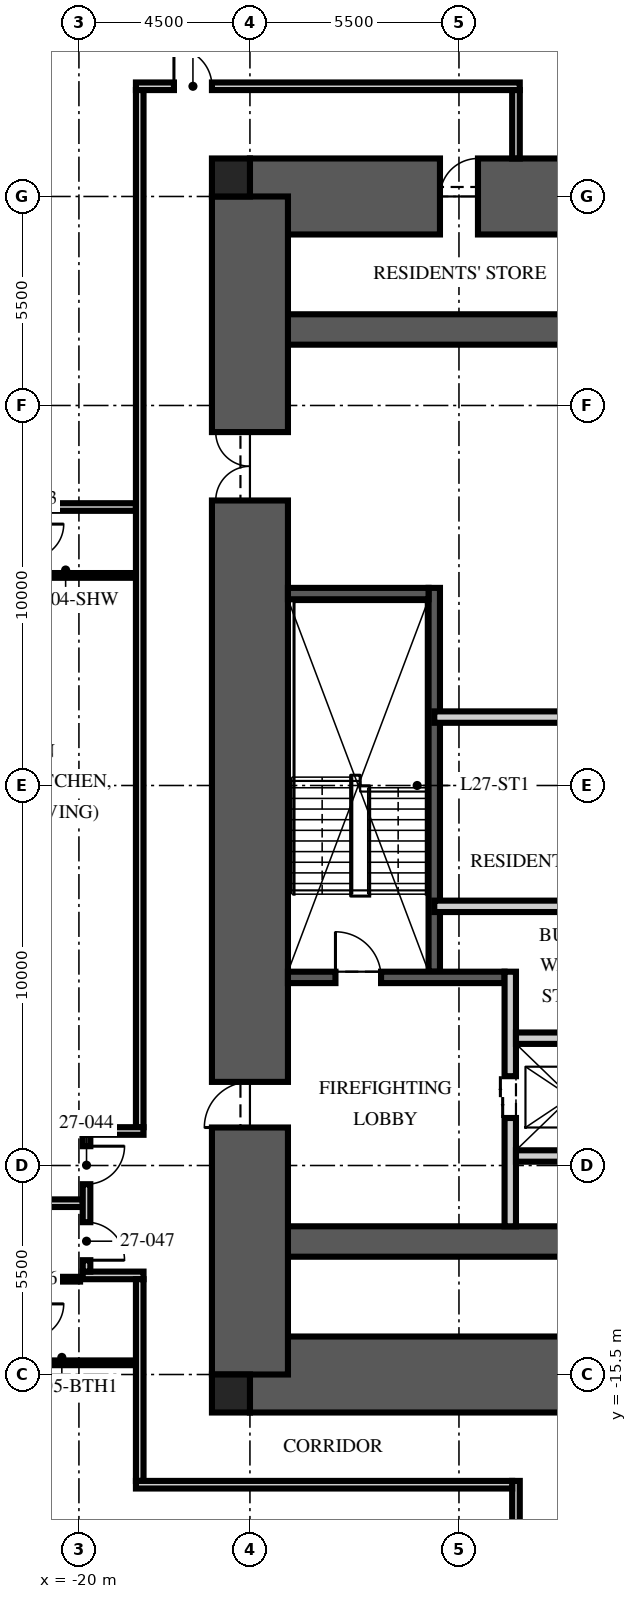
"""IFC4 building model, lengths in metres.
Left out: names, types, materials, properties, quantities, classifications, styles, units other than length and angle.
Written with IfcOpenShell. Run it as: python <this file> out.ifc"""

import sys

from ifc_helpers import new_model, si_unit, direction, frame, frame_2d, origin, origin_2d, place, context, subcontext, project, spatial, rectangle, extrude, element, fill, save


model = new_model("IFC4")
c1 = context("Model", 3, precision=1e-05, world=origin(), true_north=direction((0.0, 1.0)))
c2 = subcontext(c1, "Body", "Model", "MODEL_VIEW")
j1 = project(units=[si_unit("LENGTHUNIT", "METRE"), si_unit("PLANEANGLEUNIT", "RADIAN")], contexts=[c1])
p1 = place(None, origin())
s1 = spatial("IfcSite", under=j1, at=p1, CompositionType="ELEMENT")
p2 = place(p1, origin())
s2 = spatial("IfcBuilding", under=s1, at=p2, CompositionType="ELEMENT")
p3 = place(p2, frame((0.0, 0.0, 111.0)))
s3 = spatial("IfcBuildingStorey", under=s2, at=p3, CompositionType="ELEMENT", Elevation=111.0)
p4 = place(p3, frame((-15.5, 15.5, -0.25), z_axis=(0.0, 0.0, 1.0), x_axis=(1.0, 0.0, 0.0)))
e1 = element("IfcWall", 1, at=p4, inside=s3, PredefinedType="SHEAR", context=c2, shape_type="SweptSolid", body=[
    extrude(rectangle(XDim=31.0, YDim=2.0, at=frame_2d((15.5, 0.0))), origin(), (0.0, 0.0, 1.0), 3.75),
])
p5 = place(p4, frame((5.0, 0.0, 0.25)))
e2 = element("IfcOpeningElement", 2, at=p5, cuts=e1, PredefinedType="OPENING", context=c2, shape_type="SweptSolid", body=[
    extrude(rectangle(XDim=1.0, YDim=2.1, at=frame_2d((0.5, 1.05))), frame((0.0, 1.01, 0.0), z_axis=(0.0, -1.0, 0.0), x_axis=(1.0, 0.0, 0.0)), (0.0, 0.0, 1.0), 2.02),
])
p6 = place(p3, frame((-15.5, -15.5, -0.25), z_axis=(0.0, 0.0, 1.0), x_axis=(1.0, 0.0, 0.0)))
e3 = element("IfcWall", 3, at=p6, inside=s3, PredefinedType="SHEAR", context=c2, shape_type="SweptSolid", body=[
    extrude(rectangle(XDim=31.0, YDim=2.0, at=frame_2d((15.5, 0.0))), origin(), (0.0, 0.0, 1.0), 3.75),
])
p7 = place(p6, frame((10.4, 0.0, 0.25)))
e4 = element("IfcOpeningElement", 4, at=p7, cuts=e3, PredefinedType="OPENING", context=c2, shape_type="SweptSolid", body=[
    extrude(rectangle(XDim=1.1, YDim=2.1, at=frame_2d((0.55, 1.05))), frame((0.0, 1.01, 0.0), z_axis=(0.0, -1.0, 0.0), x_axis=(1.0, 0.0, 0.0)), (0.0, 0.0, 1.0), 2.02),
])
p8 = place(p6, frame((13.5, 0.0, 0.25)))
e5 = element("IfcOpeningElement", 5, at=p8, cuts=e3, PredefinedType="OPENING", context=c2, shape_type="SweptSolid", body=[
    extrude(rectangle(XDim=1.1, YDim=2.1, at=frame_2d((0.55, 1.05))), frame((0.0, 1.01, 0.0), z_axis=(0.0, -1.0, 0.0), x_axis=(1.0, 0.0, 0.0)), (0.0, 0.0, 1.0), 2.02),
])
p9 = place(p6, frame((16.6, 0.0, 0.25)))
e6 = element("IfcOpeningElement", 6, at=p9, cuts=e3, PredefinedType="OPENING", context=c2, shape_type="SweptSolid", body=[
    extrude(rectangle(XDim=1.1, YDim=2.1, at=frame_2d((0.55, 1.05))), frame((0.0, 1.01, 0.0), z_axis=(0.0, -1.0, 0.0), x_axis=(1.0, 0.0, 0.0)), (0.0, 0.0, 1.0), 2.02),
])
for number, where, z_axis, x_axis in (
    (7, (-15.5, 12.0, -0.25), (0.0, 0.0, 1.0), (1.0, 0.0, 0.0)),
    (8, (-15.5, -12.0, -0.25), (0.0, 0.0, 1.0), (1.0, 0.0, 0.0)),
):
    element("IfcWall", number, at=place(p3, frame(where, z_axis=z_axis, x_axis=x_axis)), inside=s3, PredefinedType="SHEAR", context=c2, shape_type="SweptSolid", body=[
        extrude(rectangle(XDim=31.0, YDim=0.8, at=frame_2d((15.5, 0.0))), origin(), (0.0, 0.0, 1.0), 3.75),
    ])
p10 = place(p3, frame((-15.5, -15.5, -0.25), z_axis=(0.0, 0.0, 1.0), x_axis=(0.0, 1.0, 0.0)))
e9 = element("IfcWall", 9, at=p10, inside=s3, PredefinedType="SHEAR", context=c2, shape_type="SweptSolid", body=[
    extrude(rectangle(XDim=31.0, YDim=2.0, at=frame_2d((15.5, 0.0))), origin(), (0.0, 0.0, 1.0), 3.75),
])
p11 = place(p10, frame((6.5, 0.0, 0.25)))
e10 = element("IfcOpeningElement", 10, at=p11, cuts=e9, PredefinedType="OPENING", context=c2, shape_type="SweptSolid", body=[
    extrude(rectangle(XDim=1.2, YDim=2.1, at=frame_2d((0.6, 1.05))), frame((0.0, 1.01, 0.0), z_axis=(0.0, -1.0, 0.0), x_axis=(1.0, 0.0, 0.0)), (0.0, 0.0, 1.0), 2.02),
])
p12 = place(p10, frame((23.0, 0.0, 0.25)))
e11 = element("IfcOpeningElement", 11, at=p12, cuts=e9, PredefinedType="OPENING", context=c2, shape_type="SweptSolid", body=[
    extrude(rectangle(XDim=1.8, YDim=2.1, at=frame_2d((0.9, 1.05))), frame((0.0, 1.01, 0.0), z_axis=(0.0, -1.0, 0.0), x_axis=(1.0, 0.0, 0.0)), (0.0, 0.0, 1.0), 2.02),
])
for number, where, z_axis, x_axis in (
    (12, (-16.0, 16.0, -0.25), (0.0, 0.0, 1.0), (1.0, 0.0, 0.0)),
    (13, (-16.0, -16.0, -0.25), (0.0, 0.0, 1.0), (1.0, 0.0, 0.0)),
):
    element("IfcColumn", number, at=place(p3, frame(where, z_axis=z_axis, x_axis=x_axis)), inside=s3, PredefinedType="COLUMN", context=c2, shape_type="SweptSolid", body=[
        extrude(rectangle(XDim=1.0, YDim=1.0, at=origin_2d()), origin(), (0.0, 0.0, 1.0), 3.75),
    ])
p13 = place(p3, frame((-10.65, -4.9, 0.0), z_axis=(0.0, 0.0, 1.0), x_axis=(0.0, 1.0, 0.0)))
e14 = element("IfcWall", 14, at=p13, inside=s3, PredefinedType="SOLIDWALL", context=c2, shape_type="SweptSolid", body=[
    extrude(rectangle(XDim=10.1, YDim=0.3, at=frame_2d((5.05, 0.0))), origin(), (0.0, 0.0, 1.0), 3.5),
])
p14 = place(p3, frame((-14.5, -5.05, 0.0), z_axis=(0.0, 0.0, 1.0), x_axis=(1.0, 0.0, 0.0)))
e15 = element("IfcWall", 15, at=p14, inside=s3, PredefinedType="SOLIDWALL", context=c2, shape_type="SweptSolid", body=[
    extrude(rectangle(XDim=5.7, YDim=0.3, at=frame_2d((2.85, 0.0))), origin(), (0.0, 0.0, 1.0), 3.5),
])
p15 = place(p14, frame((1.25, 0.0, 0.0)))
e16 = element("IfcOpeningElement", 16, at=p15, cuts=e15, PredefinedType="OPENING", context=c2, shape_type="SweptSolid", body=[
    extrude(rectangle(XDim=1.2, YDim=2.1, at=frame_2d((0.6, 1.05))), frame((0.0, 0.16, 0.0), z_axis=(0.0, -1.0, 0.0), x_axis=(1.0, 0.0, 0.0)), (0.0, 0.0, 1.0), 0.32),
])
p16 = place(p3, frame((-14.5, 5.05, 0.0), z_axis=(0.0, 0.0, 1.0), x_axis=(1.0, 0.0, 0.0)))
e17 = element("IfcWall", 17, at=p16, inside=s3, PredefinedType="SOLIDWALL", context=c2, shape_type="SweptSolid", body=[
    extrude(rectangle(XDim=3.7, YDim=0.3, at=frame_2d((1.85, 0.0))), origin(), (0.0, 0.0, 1.0), 3.5),
])
p17 = place(p3, frame((-8.65, -11.6, 0.0), z_axis=(0.0, 0.0, 1.0), x_axis=(0.0, 1.0, 0.0)))
e18 = element("IfcWall", 18, at=p17, inside=s3, PredefinedType="PARTITIONING", context=c2, shape_type="SweptSolid", body=[
    extrude(rectangle(XDim=6.7, YDim=0.3, at=frame_2d((3.35, 0.0))), origin(), (0.0, 0.0, 1.0), 3.5),
])
p18 = place(p17, frame((2.85, 0.0, 0.0)))
e19 = element("IfcOpeningElement", 19, at=p18, cuts=e18, PredefinedType="OPENING", context=c2, shape_type="SweptSolid", body=[
    extrude(rectangle(XDim=1.1, YDim=2.1, at=frame_2d((0.55, 1.05))), frame((0.0, 0.16, 0.0), z_axis=(0.0, -1.0, 0.0), x_axis=(1.0, 0.0, 0.0)), (0.0, 0.0, 1.0), 0.32),
])
p19 = place(p3, frame((-8.5, -6.65, 0.0), z_axis=(0.0, 0.0, 1.0), x_axis=(1.0, 0.0, 0.0)))
e20 = element("IfcWall", 20, at=p19, inside=s3, PredefinedType="PARTITIONING", context=c2, shape_type="SweptSolid", body=[
    extrude(rectangle(XDim=17.0, YDim=0.3, at=frame_2d((8.5, 0.0))), origin(), (0.0, 0.0, 1.0), 3.5),
])
p20 = place(p19, frame((7.8, 0.0, 0.0)))
e21 = element("IfcOpeningElement", 21, at=p20, cuts=e20, PredefinedType="OPENING", context=c2, shape_type="SweptSolid", body=[
    extrude(rectangle(XDim=1.3, YDim=2.4, at=frame_2d((0.65, 1.2))), frame((0.0, 0.16, 0.0), z_axis=(0.0, -1.0, 0.0), x_axis=(1.0, 0.0, 0.0)), (0.0, 0.0, 1.0), 0.32),
])
p21 = place(p19, frame((5.65, 0.0, 0.0)))
e22 = element("IfcOpeningElement", 22, at=p21, cuts=e20, PredefinedType="OPENING", context=c2, shape_type="SweptSolid", body=[
    extrude(rectangle(XDim=0.9, YDim=2.1, at=frame_2d((0.45, 1.05))), frame((0.0, 0.16, 0.0), z_axis=(0.0, -1.0, 0.0), x_axis=(1.0, 0.0, 0.0)), (0.0, 0.0, 1.0), 0.32),
])
p22 = place(p19, frame((10.4, 0.0, 0.0)))
e23 = element("IfcOpeningElement", 23, at=p22, cuts=e20, PredefinedType="OPENING", context=c2, shape_type="SweptSolid", body=[
    extrude(rectangle(XDim=0.9, YDim=2.1, at=frame_2d((0.45, 1.05))), frame((0.0, 0.16, 0.0), z_axis=(0.0, -1.0, 0.0), x_axis=(1.0, 0.0, 0.0)), (0.0, 0.0, 1.0), 0.32),
])
p23 = place(p3, frame((-8.5, -9.75, 0.0), z_axis=(0.0, 0.0, 1.0), x_axis=(1.0, 0.0, 0.0)))
e24 = element("IfcWall", 24, at=p23, inside=s3, PredefinedType="PARTITIONING", context=c2, shape_type="SweptSolid", body=[
    extrude(rectangle(XDim=2.9, YDim=0.3, at=frame_2d((1.45, 0.0))), origin(), (0.0, 0.0, 1.0), 3.5),
])
p24 = place(p3, frame((-10.65, 1.8, 0.0), z_axis=(0.0, 0.0, 1.0), x_axis=(1.0, 0.0, 0.0)))
e25 = element("IfcWall", 25, at=p24, inside=s3, PredefinedType="PARTITIONING", context=c2, shape_type="SweptSolid", body=[
    extrude(rectangle(XDim=21.3, YDim=0.3, at=frame_2d((10.65, 0.0))), origin(), (0.0, 0.0, 1.0), 3.5),
])
p25 = place(p24, frame((10.05, 0.0, 0.0)))
e26 = element("IfcOpeningElement", 26, at=p25, cuts=e25, PredefinedType="OPENING", context=c2, shape_type="SweptSolid", body=[
    extrude(rectangle(XDim=1.2, YDim=2.1, at=frame_2d((0.6, 1.05))), frame((0.0, 0.16, 0.0), z_axis=(0.0, -1.0, 0.0), x_axis=(1.0, 0.0, 0.0)), (0.0, 0.0, 1.0), 0.32),
])
p26 = place(p24, frame((19.238, 0.0, 0.0)))
e27 = element("IfcOpeningElement", 27, at=p26, cuts=e25, PredefinedType="OPENING", context=c2, shape_type="SweptSolid", body=[
    extrude(rectangle(XDim=0.9, YDim=2.1, at=frame_2d((0.45, 1.05))), frame((0.0, 0.16, 0.0), z_axis=(0.0, -1.0, 0.0), x_axis=(1.0, 0.0, 0.0)), (0.0, 0.0, 1.0), 0.32),
])
p27 = place(p3, frame((-10.65, -3.18, 0.0), z_axis=(0.0, 0.0, 1.0), x_axis=(1.0, 0.0, 0.0)))
e28 = element("IfcWall", 28, at=p27, inside=s3, PredefinedType="PARTITIONING", context=c2, shape_type="SweptSolid", body=[
    extrude(rectangle(XDim=6.45, YDim=0.3, at=frame_2d((3.225, 0.0))), origin(), (0.0, 0.0, 1.0), 3.5),
])
p28 = place(p3, frame((-18.5, 18.4, 0.0), z_axis=(0.0, 0.0, 1.0), x_axis=(1.0, 0.0, 0.0)))
e29 = element("IfcWall", 29, at=p28, inside=s3, PredefinedType="PARTITIONING", context=c2, shape_type="SweptSolid", body=[
    extrude(rectangle(XDim=10.1, YDim=0.2, at=frame_2d((5.05, 0.0))), origin(), (0.0, 0.0, 1.0), 2.3),
])
p29 = place(p28, frame((1.0, 0.0, 0.0)))
e30 = element("IfcOpeningElement", 30, at=p29, cuts=e29, PredefinedType="OPENING", context=c2, shape_type="SweptSolid", body=[
    extrude(rectangle(XDim=1.0, YDim=2.2, at=frame_2d((0.5, 1.1))), frame((0.0, 0.11, 0.0), z_axis=(0.0, -1.0, 0.0), x_axis=(1.0, 0.0, 0.0)), (0.0, 0.0, 1.0), 0.22),
])
p30 = place(p3, frame((-8.5, 18.3, 0.0), z_axis=(0.0, 0.0, 1.0), x_axis=(0.0, -1.0, 0.0)))
e31 = element("IfcWall", 31, at=p30, inside=s3, PredefinedType="PARTITIONING", context=c2, shape_type="SweptSolid", body=[
    extrude(rectangle(XDim=1.8, YDim=0.2, at=frame_2d((0.9, 0.0))), origin(), (0.0, 0.0, 1.0), 3.5),
])
p31 = place(p3, frame((-18.5, 7.328, 0.0), z_axis=(0.0, 0.0, 1.0), x_axis=(-1.0, 0.0, 0.0)))
e32 = element("IfcWall", 32, at=p31, inside=s3, PredefinedType="PARTITIONING", context=c2, shape_type="SweptSolid", body=[
    extrude(rectangle(XDim=10.65, YDim=0.2, at=frame_2d((5.325, 0.0))), origin(), (0.0, 0.0, 1.0), 2.81),
])
p32 = place(p3, frame((-19.9, -10.992, 0.0), z_axis=(0.0, 0.0, 1.0), x_axis=(-1.0, 0.0, 0.0)))
e33 = element("IfcWall", 33, at=p32, inside=s3, PredefinedType="PARTITIONING", context=c2, shape_type="SweptSolid", body=[
    extrude(rectangle(XDim=9.25, YDim=0.2, at=frame_2d((4.625, 0.0))), origin(), (0.0, 0.0, 1.0), 2.81),
])
p33 = place(p3, frame((-18.5, 5.528, 0.0), z_axis=(0.0, 0.0, 1.0), x_axis=(-1.0, 0.0, 0.0)))
e34 = element("IfcWall", 34, at=p33, inside=s3, PredefinedType="PARTITIONING", context=c2, shape_type="SweptSolid", body=[
    extrude(rectangle(XDim=2.8, YDim=0.125, at=frame_2d((1.4, 0.0))), origin(), (0.0, 0.0, 1.0), 3.5),
])
p34 = place(p3, frame((-19.97, -12.992, 0.0), z_axis=(0.0, 0.0, 1.0), x_axis=(-1.0, 0.0, 0.0)))
e35 = element("IfcWall", 35, at=p34, inside=s3, PredefinedType="PARTITIONING", context=c2, shape_type="SweptSolid", body=[
    extrude(rectangle(XDim=1.33, YDim=0.125, at=frame_2d((0.665, 0.0))), origin(), (0.0, 0.0, 1.0), 3.5),
])
p35 = place(p3, frame((-18.5, -15.192, 0.0), z_axis=(0.0, 0.0, 1.0), x_axis=(-1.0, 0.0, 0.0)))
e36 = element("IfcWall", 36, at=p35, inside=s3, PredefinedType="PARTITIONING", context=c2, shape_type="SweptSolid", body=[
    extrude(rectangle(XDim=2.8, YDim=0.125, at=frame_2d((1.4, 0.0))), origin(), (0.0, 0.0, 1.0), 3.5),
])
p36 = place(p3, frame((-18.4, 18.3, 0.0), z_axis=(0.0, 0.0, 1.0), x_axis=(0.0, -1.0, 0.0)))
e37 = element("IfcWall", 37, at=p36, inside=s3, PredefinedType="PARTITIONING", context=c2, shape_type="SweptSolid", body=[
    extrude(rectangle(XDim=27.292, YDim=0.2, at=frame_2d((13.646, 0.0))), origin(), (0.0, 0.0, 1.0), 2.3),
])
p37 = place(p3, frame((-18.3, -9.092, 0.0), z_axis=(0.0, 0.0, 1.0), x_axis=(-1.0, 0.0, 0.0)))
e38 = element("IfcWall", 38, at=p37, inside=s3, PredefinedType="PARTITIONING", context=c2, shape_type="SweptSolid", body=[
    extrude(rectangle(XDim=1.6, YDim=0.2, at=frame_2d((0.8, 0.0))), origin(), (0.0, 0.0, 1.0), 2.7),
])
p38 = place(p3, frame((-18.3, -12.892, 0.0), z_axis=(0.0, 0.0, 1.0), x_axis=(-1.0, 0.0, 0.0)))
e39 = element("IfcWall", 39, at=p38, inside=s3, PredefinedType="PARTITIONING", context=c2, shape_type="SweptSolid", body=[
    extrude(rectangle(XDim=1.6, YDim=0.2, at=frame_2d((0.8, 0.0))), origin(), (0.0, 0.0, 1.0), 3.5),
])
p39 = place(p3, frame((-19.8, -9.192, 0.0), z_axis=(0.0, 0.0, 1.0), x_axis=(0.0, -1.0, 0.0)))
e40 = element("IfcWall", 40, at=p39, inside=s3, PredefinedType="PARTITIONING", context=c2, shape_type="SweptSolid", body=[
    extrude(rectangle(XDim=3.6, YDim=0.2, at=frame_2d((1.8, 0.0))), origin(), (0.0, 0.0, 1.0), 2.7),
])
p40 = place(p39, frame((0.3, 0.0, 0.0)))
e41 = element("IfcOpeningElement", 41, at=p40, cuts=e40, PredefinedType="OPENING", context=c2, shape_type="SweptSolid", body=[
    extrude(rectangle(XDim=1.0, YDim=2.2, at=frame_2d((0.5, 1.1))), frame((0.0, 0.11, 0.0), z_axis=(0.0, -1.0, 0.0), x_axis=(1.0, 0.0, 0.0)), (0.0, 0.0, 1.0), 0.22),
])
p41 = place(p39, frame((2.3, 0.0, 0.0)))
e42 = element("IfcOpeningElement", 42, at=p41, cuts=e40, PredefinedType="OPENING", context=c2, shape_type="SweptSolid", body=[
    extrude(rectangle(XDim=1.0, YDim=2.2, at=frame_2d((0.5, 1.1))), frame((0.0, 0.11, 0.0), z_axis=(0.0, -1.0, 0.0), x_axis=(1.0, 0.0, 0.0)), (0.0, 0.0, 1.0), 0.22),
])
p42 = place(p3, frame((-18.4, -12.992, 0.0), z_axis=(0.0, 0.0, 1.0), x_axis=(0.0, -1.0, 0.0)))
e43 = element("IfcWall", 43, at=p42, inside=s3, PredefinedType="PARTITIONING", context=c2, shape_type="SweptSolid", body=[
    extrude(rectangle(XDim=5.308, YDim=0.2, at=frame_2d((2.654, 0.0))), origin(), (0.0, 0.0, 1.0), 2.3),
])
p43 = place(p3, frame((-8.5, -18.3, 0.0), z_axis=(0.0, 0.0, 1.0), x_axis=(0.0, -1.0, 0.0)))
e44 = element("IfcWall", 44, at=p43, inside=s3, PredefinedType="PARTITIONING", context=c2, shape_type="SweptSolid", body=[
    extrude(rectangle(XDim=3.0, YDim=0.2, at=frame_2d((1.5, 0.0))), origin(), (0.0, 0.0, 1.0), 3.5),
])
p44 = place(p3, frame((-8.6, -18.4, 0.0), z_axis=(0.0, 0.0, 1.0), x_axis=(-1.0, 0.0, 0.0)))
e45 = element("IfcWall", 45, at=p44, inside=s3, PredefinedType="PARTITIONING", context=c2, shape_type="SweptSolid", body=[
    extrude(rectangle(XDim=9.9, YDim=0.2, at=frame_2d((4.95, 0.0))), origin(), (0.0, 0.0, 1.0), 2.3),
])
p45 = place(p15, origin())
e46 = element("IfcDoor", 46, at=p45, inside=s3, OperationType="SINGLE_SWING_LEFT", PredefinedType="DOOR", context=c2, shape_type="SweptSolid", body=[
    extrude(rectangle(XDim=1.2, YDim=2.1, at=frame_2d((0.6, 1.05))), frame((0.0, 0.025, 0.0), z_axis=(0.0, -1.0, 0.0), x_axis=(1.0, 0.0, 0.0)), (0.0, 0.0, 1.0), 0.05),
])
fill(e16, e46)
p46 = place(p11, origin())
e47 = element("IfcDoor", 47, at=p46, inside=s3, OperationType="SINGLE_SWING_LEFT", PredefinedType="DOOR", context=c2, shape_type="SweptSolid", body=[
    extrude(rectangle(XDim=1.2, YDim=2.1, at=frame_2d((0.6, 1.05))), frame((0.0, 0.025, 0.0), z_axis=(0.0, -1.0, 0.0), x_axis=(1.0, 0.0, 0.0)), (0.0, 0.0, 1.0), 0.05),
])
fill(e10, e47)
p47 = place(p12, origin())
e48 = element("IfcDoor", 48, at=p47, inside=s3, OperationType="DOUBLE_DOOR_SINGLE_SWING", PredefinedType="DOOR", context=c2, shape_type="SweptSolid", body=[
    extrude(rectangle(XDim=1.8, YDim=2.1, at=frame_2d((0.9, 1.05))), frame((0.0, 0.025, 0.0), z_axis=(0.0, -1.0, 0.0), x_axis=(1.0, 0.0, 0.0)), (0.0, 0.0, 1.0), 0.05),
])
fill(e11, e48)
p48 = place(p18, origin())
e49 = element("IfcDoor", 49, at=p48, inside=s3, OperationType="DOUBLE_DOOR_SLIDING", PredefinedType="DOOR", context=c2, shape_type="SweptSolid", body=[
    extrude(rectangle(XDim=1.1, YDim=2.1, at=frame_2d((0.55, 1.05))), frame((0.0, 0.025, 0.0), z_axis=(0.0, -1.0, 0.0), x_axis=(1.0, 0.0, 0.0)), (0.0, 0.0, 1.0), 0.05),
])
fill(e19, e49)
p49 = place(p5, origin())
e50 = element("IfcDoor", 50, at=p49, inside=s3, OperationType="SINGLE_SWING_RIGHT", PredefinedType="DOOR", context=c2, shape_type="SweptSolid", body=[
    extrude(rectangle(XDim=1.0, YDim=2.1, at=frame_2d((0.5, 1.05))), frame((0.0, 0.025, 0.0), z_axis=(0.0, -1.0, 0.0), x_axis=(1.0, 0.0, 0.0)), (0.0, 0.0, 1.0), 0.05),
])
fill(e2, e50)
p50 = place(p29, origin())
e51 = element("IfcDoor", 51, at=p50, inside=s3, OperationType="SINGLE_SWING_LEFT", PredefinedType="DOOR", context=c2, shape_type="SweptSolid", body=[
    extrude(rectangle(XDim=1.0, YDim=2.2, at=frame_2d((0.5, 1.1))), frame((0.0, 0.025, 0.0), z_axis=(0.0, -1.0, 0.0), x_axis=(1.0, 0.0, 0.0)), (0.0, 0.0, 1.0), 0.05),
])
fill(e30, e51)
p51 = place(p40, origin())
e52 = element("IfcDoor", 52, at=p51, inside=s3, OperationType="SINGLE_SWING_LEFT", PredefinedType="DOOR", context=c2, shape_type="SweptSolid", body=[
    extrude(rectangle(XDim=1.0, YDim=2.2, at=frame_2d((0.5, 1.1))), frame((0.0, 0.025, 0.0), z_axis=(0.0, -1.0, 0.0), x_axis=(1.0, 0.0, 0.0)), (0.0, 0.0, 1.0), 0.05),
])
fill(e41, e52)
p52 = place(p41, origin())
e53 = element("IfcDoor", 53, at=p52, inside=s3, OperationType="SINGLE_SWING_RIGHT", PredefinedType="DOOR", context=c2, shape_type="SweptSolid", body=[
    extrude(rectangle(XDim=1.0, YDim=2.2, at=frame_2d((0.5, 1.1))), frame((0.0, 0.025, 0.0), z_axis=(0.0, -1.0, 0.0), x_axis=(1.0, 0.0, 0.0)), (0.0, 0.0, 1.0), 0.05),
])
fill(e42, e53)
save(model, sys.argv[1])
